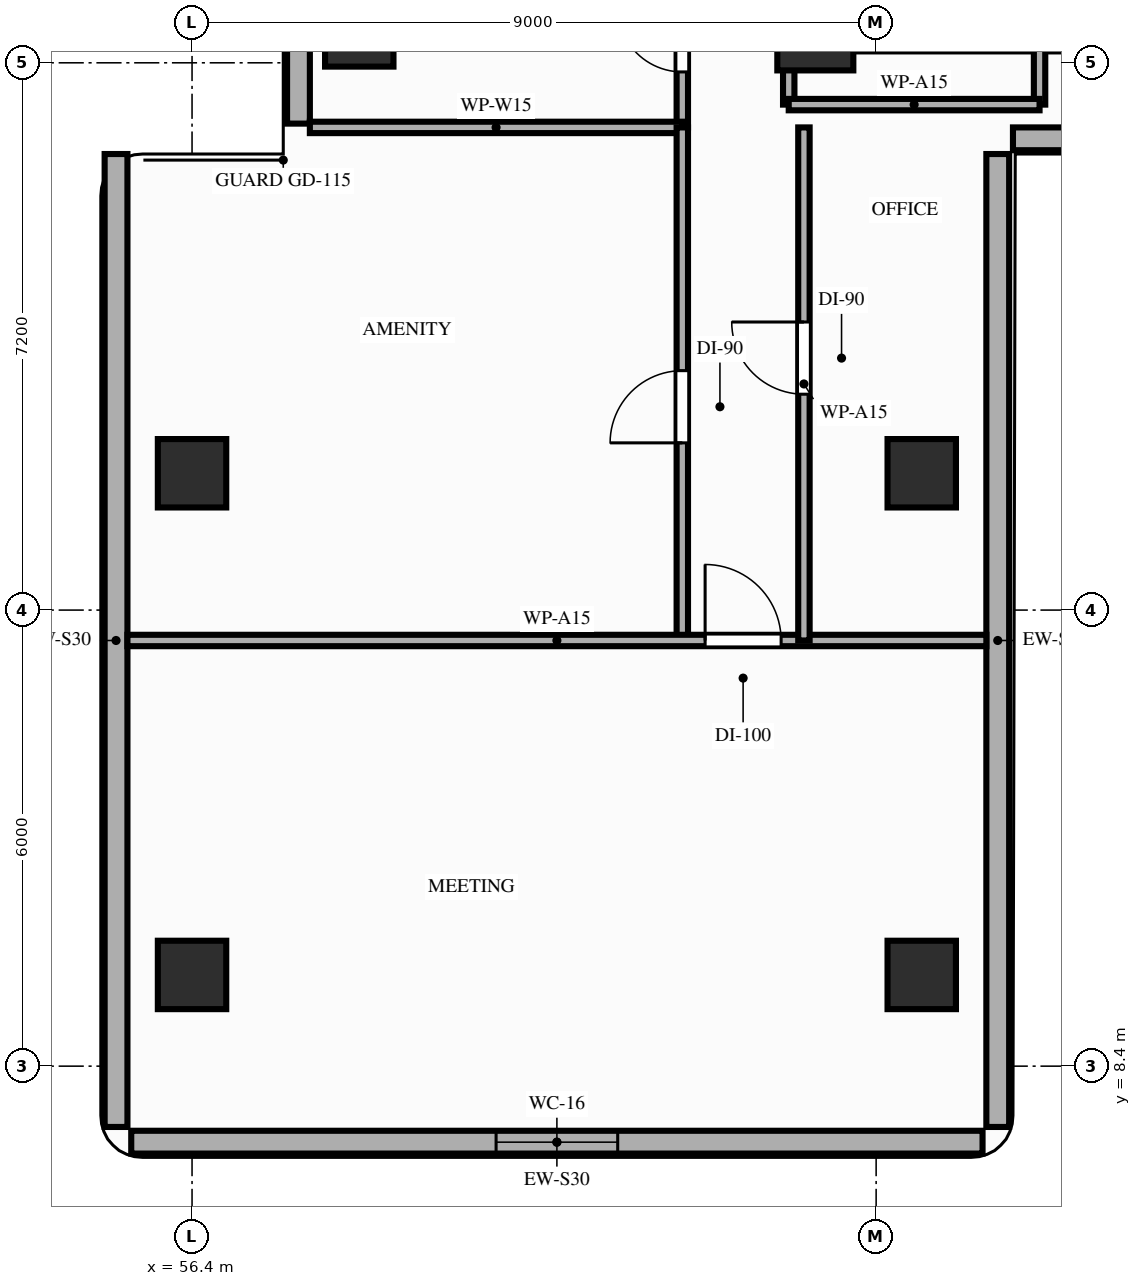
"""IFC4 building model, lengths in metres.
Left out: names, types, materials, properties, quantities, classifications, styles, units other than length and angle.
Written with IfcOpenShell. Run it as: python <this file> out.ifc"""

import sys

from ifc_helpers import new_model, si_unit, direction, frame, frame_2d, origin, origin_2d, place, context, subcontext, project, spatial, rectangle, extrude, element, fill, save


model = new_model("IFC4")
c1 = context("Model", 3, precision=1e-05, world=origin(), true_north=direction((0.0, 1.0)))
c2 = subcontext(c1, "Body", "Model", "MODEL_VIEW")
j1 = project(units=[si_unit("LENGTHUNIT", "METRE"), si_unit("PLANEANGLEUNIT", "RADIAN")], contexts=[c1])
p1 = place(None, origin())
s1 = spatial("IfcSite", under=j1, at=p1, CompositionType="ELEMENT")
p2 = place(p1, origin())
s2 = spatial("IfcBuilding", under=s1, at=p2, CompositionType="ELEMENT")
p3 = place(p2, frame((0.0, 0.0, 79.4)))
s3 = spatial("IfcBuildingStorey", under=s2, at=p3, CompositionType="ELEMENT", Elevation=79.4)
p4 = place(p3, frame((64.6, 22.0, 0.0), z_axis=(0.0, 0.0, 1.0), x_axis=(1.0, 0.0, 0.0)))
e1 = element("IfcColumn", 1, at=p4, inside=s3, PredefinedType="COLUMN", context=c2, shape_type="SweptSolid", body=[
    extrude(rectangle(XDim=1.0, YDim=1.0, at=origin_2d()), origin(), (0.0, 0.0, 1.0), 4.0),
])
for number, where, z_axis, x_axis in (
    (2, (58.6, 22.0, 0.0), (0.0, 0.0, 1.0), (1.0, 0.0, 0.0)),
    (3, (56.4, 9.6, 0.0), (0.0, 0.0, 1.0), (1.0, 0.0, 0.0)),
    (4, (56.4, 16.2, 0.0), (0.0, 0.0, 1.0), (1.0, 0.0, 0.0)),
    (5, (66.0, 9.6, 0.0), (0.0, 0.0, 1.0), (1.0, 0.0, 0.0)),
    (6, (66.0, 16.2, 0.0), (0.0, 0.0, 1.0), (1.0, 0.0, 0.0)),
):
    element("IfcColumn", number, at=place(p3, frame(where, z_axis=z_axis, x_axis=x_axis)), inside=s3, PredefinedType="COLUMN", context=c2, shape_type="SweptSolid", body=[
        extrude(rectangle(XDim=0.9, YDim=0.9, at=origin_2d()), origin(), (0.0, 0.0, 1.0), 4.0),
    ])
p5 = place(p3, frame((57.8, 43.4, 0.0), z_axis=(0.0, 0.0, 1.0), x_axis=(0.0, -1.0, 0.0)))
e7 = element("IfcWall", 7, at=p5, inside=s3, PredefinedType="STANDARD", context=c2, shape_type="SweptSolid", body=[
    extrude(rectangle(XDim=22.6, YDim=0.3, at=frame_2d((11.3, 0.0))), origin(), (0.0, 0.0, 1.0), 3.4),
])
p6 = place(p5, frame((10.3, 0.0, 0.85)))
e8 = element("IfcOpeningElement", 8, at=p6, cuts=e7, PredefinedType="OPENING", context=c2, shape_type="SweptSolid", body=[
    extrude(rectangle(XDim=1.6, YDim=1.7, at=frame_2d((0.8, 0.85))), frame((0.0, 0.16, 0.0), z_axis=(0.0, -1.0, 0.0), x_axis=(1.0, 0.0, 0.0)), (0.0, 0.0, 1.0), 0.32),
])
p7 = place(p5, frame((3.6, 0.0, 0.85)))
e9 = element("IfcOpeningElement", 9, at=p7, cuts=e7, PredefinedType="OPENING", context=c2, shape_type="SweptSolid", body=[
    extrude(rectangle(XDim=1.6, YDim=1.7, at=frame_2d((0.8, 0.85))), frame((0.0, 0.16, 0.0), z_axis=(0.0, -1.0, 0.0), x_axis=(1.0, 0.0, 0.0)), (0.0, 0.0, 1.0), 0.32),
])
p8 = place(p3, frame((55.6, 7.4, 0.0), z_axis=(0.0, 0.0, 1.0), x_axis=(1.0, 0.0, 0.0)))
e10 = element("IfcWall", 10, at=p8, inside=s3, PredefinedType="STANDARD", context=c2, shape_type="SweptSolid", body=[
    extrude(rectangle(XDim=11.2, YDim=0.3, at=frame_2d((5.6, 0.0))), origin(), (0.0, 0.0, 1.0), 3.82),
])
p9 = place(p8, frame((4.8, 0.0, 0.85)))
e11 = element("IfcOpeningElement", 11, at=p9, cuts=e10, PredefinedType="OPENING", context=c2, shape_type="SweptSolid", body=[
    extrude(rectangle(XDim=1.6, YDim=1.7, at=frame_2d((0.8, 0.85))), frame((0.0, 0.16, 0.0), z_axis=(0.0, -1.0, 0.0), x_axis=(1.0, 0.0, 0.0)), (0.0, 0.0, 1.0), 0.32),
])
for number, where, z_axis, x_axis in (
    (12, (55.4, 20.4, 0.0), (0.0, 0.0, 1.0), (0.0, -1.0, 0.0)),
    (13, (67.0, 7.6, 0.0), (0.0, 0.0, 1.0), (0.0, 1.0, 0.0)),
):
    element("IfcWall", number, at=place(p3, frame(where, z_axis=z_axis, x_axis=x_axis)), inside=s3, PredefinedType="STANDARD", context=c2, shape_type="SweptSolid", body=[
        extrude(rectangle(XDim=12.8, YDim=0.3, at=frame_2d((6.4, 0.0))), origin(), (0.0, 0.0, 1.0), 3.82),
    ])
p10 = place(p3, frame((67.2, 20.6, 0.0), z_axis=(0.0, 0.0, 1.0), x_axis=(1.0, 0.0, 0.0)))
e14 = element("IfcWall", 14, at=p10, inside=s3, PredefinedType="STANDARD", context=c2, shape_type="SweptSolid", body=[
    extrude(rectangle(XDim=5.6, YDim=0.3, at=frame_2d((2.8, 0.0))), origin(), (0.0, 0.0, 1.0), 3.82),
])
p11 = place(p3, frame((64.25, 21.05, 0.0), z_axis=(0.0, 0.0, 1.0), x_axis=(0.0, 1.0, 0.0)))
e15 = element("IfcWall", 15, at=p11, inside=s3, PredefinedType="PARTITIONING", context=c2, shape_type="SweptSolid", body=[
    extrude(rectangle(XDim=6.55, YDim=0.15, at=frame_2d((3.275, 0.0))), origin(), (0.0, 0.0, 1.0), 3.4),
])
p12 = place(p11, frame((3.1, 0.0, 0.0)))
e16 = element("IfcOpeningElement", 16, at=p12, cuts=e15, PredefinedType="OPENING", context=c2, shape_type="SweptSolid", body=[
    extrude(rectangle(XDim=0.95, YDim=2.15, at=frame_2d((0.475, 1.075))), frame((0.0, 0.085, 0.0), z_axis=(0.0, -1.0, 0.0), x_axis=(1.0, 0.0, 0.0)), (0.0, 0.0, 1.0), 0.17),
])
p13 = place(p3, frame((67.55, 21.05, 0.0), z_axis=(0.0, 0.0, 1.0), x_axis=(0.0, 1.0, 0.0)))
e17 = element("IfcWall", 17, at=p13, inside=s3, PredefinedType="PARTITIONING", context=c2, shape_type="SweptSolid", body=[
    extrude(rectangle(XDim=6.47, YDim=0.15, at=frame_2d((3.235, 0.0))), origin(), (0.0, 0.0, 1.0), 3.4),
])
p14 = place(p3, frame((64.25, 21.05, 0.0), z_axis=(0.0, 0.0, 1.0), x_axis=(1.0, 0.0, 0.0)))
e18 = element("IfcWall", 18, at=p14, inside=s3, PredefinedType="PARTITIONING", context=c2, shape_type="SweptSolid", body=[
    extrude(rectangle(XDim=3.3, YDim=0.15, at=frame_2d((1.65, 0.0))), origin(), (0.0, 0.0, 1.0), 3.4),
])
p15 = place(p3, frame((62.85, 20.75, 0.0), z_axis=(0.0, 0.0, 1.0), x_axis=(0.0, 1.0, 0.0)))
e19 = element("IfcWall", 19, at=p15, inside=s3, PredefinedType="PARTITIONING", context=c2, shape_type="SweptSolid", body=[
    extrude(rectangle(XDim=22.7, YDim=0.15, at=frame_2d((11.35, 0.0))), origin(), (0.0, 0.0, 1.0), 3.4),
])
p16 = place(p15, frame((0.73, 0.0, 0.0)))
e20 = element("IfcOpeningElement", 20, at=p16, cuts=e19, PredefinedType="OPENING", context=c2, shape_type="SweptSolid", body=[
    extrude(rectangle(XDim=0.85, YDim=2.1, at=frame_2d((0.425, 1.05))), frame((0.0, 0.085, 0.0), z_axis=(0.0, -1.0, 0.0), x_axis=(1.0, 0.0, 0.0)), (0.0, 0.0, 1.0), 0.17),
])
p17 = place(p15, frame((3.43, 0.0, 0.0)))
e21 = element("IfcOpeningElement", 21, at=p17, cuts=e19, PredefinedType="OPENING", context=c2, shape_type="SweptSolid", body=[
    extrude(rectangle(XDim=0.95, YDim=2.1, at=frame_2d((0.475, 1.05))), frame((0.0, 0.085, 0.0), z_axis=(0.0, -1.0, 0.0), x_axis=(1.0, 0.0, 0.0)), (0.0, 0.0, 1.0), 0.17),
])
p18 = place(p15, frame((8.15, 0.0, 0.0)))
e22 = element("IfcOpeningElement", 22, at=p18, cuts=e19, PredefinedType="OPENING", context=c2, shape_type="SweptSolid", body=[
    extrude(rectangle(XDim=0.95, YDim=2.15, at=frame_2d((0.475, 1.075))), frame((0.0, 0.085, 0.0), z_axis=(0.0, -1.0, 0.0), x_axis=(1.0, 0.0, 0.0)), (0.0, 0.0, 1.0), 0.17),
])
p19 = place(p3, frame((57.95, 20.75, 0.0), z_axis=(0.0, 0.0, 1.0), x_axis=(1.0, 0.0, 0.0)))
e23 = element("IfcWall", 23, at=p19, inside=s3, PredefinedType="PARTITIONING", context=c2, shape_type="SweptSolid", body=[
    extrude(rectangle(XDim=4.9, YDim=0.15, at=frame_2d((2.45, 0.0))), origin(), (0.0, 0.0, 1.0), 3.4),
])
p20 = place(p3, frame((62.85, 14.0, 0.0), z_axis=(0.0, 0.0, 1.0), x_axis=(0.0, 1.0, 0.0)))
e24 = element("IfcWall", 24, at=p20, inside=s3, PredefinedType="PARTITIONING", context=c2, shape_type="SweptSolid", body=[
    extrude(rectangle(XDim=6.75, YDim=0.15, at=frame_2d((3.375, 0.0))), origin(), (0.0, 0.0, 1.0), 3.4),
])
p21 = place(p20, frame((2.6, 0.0, 0.0)))
e25 = element("IfcOpeningElement", 25, at=p21, cuts=e24, PredefinedType="OPENING", context=c2, shape_type="SweptSolid", body=[
    extrude(rectangle(XDim=0.95, YDim=2.15, at=frame_2d((0.475, 1.075))), frame((0.0, 0.085, 0.0), z_axis=(0.0, -1.0, 0.0), x_axis=(1.0, 0.0, 0.0)), (0.0, 0.0, 1.0), 0.17),
])
p22 = place(p3, frame((55.55, 14.0, 0.0), z_axis=(0.0, 0.0, 1.0), x_axis=(1.0, 0.0, 0.0)))
e26 = element("IfcWall", 26, at=p22, inside=s3, PredefinedType="PARTITIONING", context=c2, shape_type="SweptSolid", body=[
    extrude(rectangle(XDim=11.3, YDim=0.15, at=frame_2d((5.65, 0.0))), origin(), (0.0, 0.0, 1.0), 3.4),
])
p23 = place(p22, frame((7.6, 0.0, 0.0)))
e27 = element("IfcOpeningElement", 27, at=p23, cuts=e26, PredefinedType="OPENING", context=c2, shape_type="SweptSolid", body=[
    extrude(rectangle(XDim=1.0, YDim=2.15, at=frame_2d((0.5, 1.075))), frame((0.0, 0.085, 0.0), z_axis=(0.0, -1.0, 0.0), x_axis=(1.0, 0.0, 0.0)), (0.0, 0.0, 1.0), 0.17),
])
p24 = place(p3, frame((64.45, 14.0, 0.0), z_axis=(0.0, 0.0, 1.0), x_axis=(0.0, 1.0, 0.0)))
e28 = element("IfcWall", 28, at=p24, inside=s3, PredefinedType="PARTITIONING", context=c2, shape_type="SweptSolid", body=[
    extrude(rectangle(XDim=6.75, YDim=0.15, at=frame_2d((3.375, 0.0))), origin(), (0.0, 0.0, 1.0), 3.4),
])
p25 = place(p24, frame((3.24, 0.0, 0.0)))
e29 = element("IfcOpeningElement", 29, at=p25, cuts=e28, PredefinedType="OPENING", context=c2, shape_type="SweptSolid", body=[
    extrude(rectangle(XDim=0.95, YDim=2.15, at=frame_2d((0.475, 1.075))), frame((0.0, 0.085, 0.0), z_axis=(0.0, -1.0, 0.0), x_axis=(1.0, 0.0, 0.0)), (0.0, 0.0, 1.0), 0.17),
])
p26 = place(p9, origin())
e30 = element("IfcWindow", 30, at=p26, inside=s3, PartitioningType="SINGLE_PANEL", PredefinedType="WINDOW", context=c2, shape_type="SweptSolid", body=[
    extrude(rectangle(XDim=1.6, YDim=1.7, at=frame_2d((0.8, 0.85))), frame((0.0, 0.03, 0.0), z_axis=(0.0, -1.0, 0.0), x_axis=(1.0, 0.0, 0.0)), (0.0, 0.0, 1.0), 0.06),
])
fill(e11, e30)
p27 = place(p16, origin())
e31 = element("IfcDoor", 31, at=p27, inside=s3, OperationType="SINGLE_SWING_RIGHT", PredefinedType="DOOR", context=c2, shape_type="SweptSolid", body=[
    extrude(rectangle(XDim=0.85, YDim=2.1, at=frame_2d((0.425, 1.05))), frame((0.0, 0.025, 0.0), z_axis=(0.0, -1.0, 0.0), x_axis=(1.0, 0.0, 0.0)), (0.0, 0.0, 1.0), 0.05),
])
fill(e20, e31)
p28 = place(p21, origin())
e32 = element("IfcDoor", 32, at=p28, inside=s3, OperationType="SINGLE_SWING_LEFT", PredefinedType="DOOR", context=c2, shape_type="SweptSolid", body=[
    extrude(rectangle(XDim=0.95, YDim=2.15, at=frame_2d((0.475, 1.075))), frame((0.0, 0.025, 0.0), z_axis=(0.0, -1.0, 0.0), x_axis=(1.0, 0.0, 0.0)), (0.0, 0.0, 1.0), 0.05),
])
fill(e25, e32)
p29 = place(p25, origin())
e33 = element("IfcDoor", 33, at=p29, inside=s3, OperationType="SINGLE_SWING_RIGHT", PredefinedType="DOOR", context=c2, shape_type="SweptSolid", body=[
    extrude(rectangle(XDim=0.95, YDim=2.15, at=frame_2d((0.475, 1.075))), frame((0.0, 0.025, 0.0), z_axis=(0.0, -1.0, 0.0), x_axis=(1.0, 0.0, 0.0)), (0.0, 0.0, 1.0), 0.05),
])
fill(e29, e33)
p30 = place(p23, origin())
e34 = element("IfcDoor", 34, at=p30, inside=s3, OperationType="SINGLE_SWING_LEFT", PredefinedType="DOOR", context=c2, shape_type="SweptSolid", body=[
    extrude(rectangle(XDim=1.0, YDim=2.15, at=frame_2d((0.5, 1.075))), frame((0.0, 0.025, 0.0), z_axis=(0.0, -1.0, 0.0), x_axis=(1.0, 0.0, 0.0)), (0.0, 0.0, 1.0), 0.05),
])
fill(e27, e34)
save(model, sys.argv[1])
